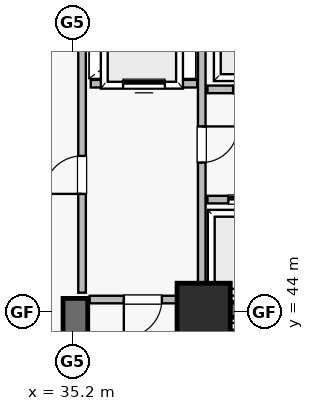
"""IFC4 building model, lengths in metres.
Left out: names, types, materials, properties, quantities, classifications, styles, units other than length and angle.
Written with IfcOpenShell. Run it as: python <this file> out.ifc"""

import sys

from ifc_helpers import new_model, si_unit, direction, frame, frame_2d, origin, origin_2d, place, context, subcontext, project, spatial, rectangle, extrude, element, fill, save


model = new_model("IFC4")
c1 = context("Model", 3, precision=1e-05, world=origin(), true_north=direction((0.0, 1.0)))
c2 = subcontext(c1, "Body", "Model", "MODEL_VIEW")
j1 = project(units=[si_unit("LENGTHUNIT", "METRE"), si_unit("PLANEANGLEUNIT", "RADIAN")], contexts=[c1])
p1 = place(None, origin())
s1 = spatial("IfcSite", under=j1, at=p1, CompositionType="ELEMENT")
p2 = place(p1, origin())
s2 = spatial("IfcBuilding", under=s1, at=p2, CompositionType="ELEMENT")
p3 = place(p2, origin())
s3 = spatial("IfcBuildingStorey", under=s2, at=p3, CompositionType="ELEMENT", Elevation=0.0)
p4 = place(p3, frame((35.275, 34.95, 0.0), z_axis=(0.0, 0.0, 1.0), x_axis=(0.0, 1.0, 0.0)))
e1 = element("IfcWall", 1, at=p4, inside=s3, PredefinedType="SHEAR", context=c2, shape_type="SweptSolid", body=[
    extrude(rectangle(XDim=9.4, YDim=0.65, at=frame_2d((4.7, 0.0))), origin(), (0.0, 0.0, 1.0), 4.5),
])
p5 = place(p3, frame((38.775, 35.4, 0.0), z_axis=(0.0, 0.0, 1.0), x_axis=(0.0, 1.0, 0.0)))
e2 = element("IfcWall", 2, at=p5, inside=s3, PredefinedType="SHEAR", context=c2, shape_type="SweptSolid", body=[
    extrude(rectangle(XDim=8.95, YDim=0.65, at=frame_2d((4.475, 0.0))), origin(), (0.0, 0.0, 1.0), 4.5),
])
p6 = place(p3, frame((38.75, 44.05, 0.0), z_axis=(0.0, 0.0, 1.0), x_axis=(1.0, 0.0, 0.0)))
e3 = element("IfcWall", 3, at=p6, inside=s3, PredefinedType="SHEAR", context=c2, shape_type="SweptSolid", body=[
    extrude(rectangle(XDim=4.2, YDim=0.4, at=frame_2d((2.1, 0.0))), origin(), (0.0, 0.0, 1.0), 4.5),
])
p7 = place(p3, frame((38.65, 44.05, 0.0), z_axis=(0.0, 0.0, 1.0), x_axis=(1.0, 0.0, 0.0)))
e4 = element("IfcColumn", 4, at=p7, inside=s3, PredefinedType="COLUMN", context=c2, shape_type="SweptSolid", body=[
    extrude(rectangle(XDim=1.4, YDim=1.4, at=origin_2d()), origin(), (0.0, 0.0, 1.0), 4.8),
])
p8 = place(p3, frame((35.45, 44.5, 0.0), z_axis=(0.0, 0.0, 1.0), x_axis=(0.0, 1.0, 0.0)))
e5 = element("IfcWall", 5, at=p8, inside=s3, PredefinedType="SOLIDWALL", context=c2, shape_type="SweptSolid", body=[
    extrude(rectangle(XDim=7.92, YDim=0.2, at=frame_2d((3.96, 0.0))), origin(), (0.0, 0.0, 1.0), 4.5),
])
p9 = place(p8, frame((2.6, 0.0, 0.0)))
e6 = element("IfcOpeningElement", 6, at=p9, cuts=e5, PredefinedType="OPENING", context=c2, shape_type="SweptSolid", body=[
    extrude(rectangle(XDim=1.0, YDim=2.15, at=frame_2d((0.5, 1.075))), frame((0.0, 0.11, 0.0), z_axis=(0.0, -1.0, 0.0), x_axis=(1.0, 0.0, 0.0)), (0.0, 0.0, 1.0), 0.22),
])
p10 = place(p3, frame((38.6, 44.5, 0.0), z_axis=(0.0, 0.0, 1.0), x_axis=(0.0, 1.0, 0.0)))
e7 = element("IfcWall", 7, at=p10, inside=s3, PredefinedType="SOLIDWALL", context=c2, shape_type="SweptSolid", body=[
    extrude(rectangle(XDim=7.92, YDim=0.2, at=frame_2d((3.96, 0.0))), origin(), (0.0, 0.0, 1.0), 4.5),
])
p11 = place(p10, frame((3.425, 0.0, 0.0)))
e8 = element("IfcOpeningElement", 8, at=p11, cuts=e7, PredefinedType="OPENING", context=c2, shape_type="SweptSolid", body=[
    extrude(rectangle(XDim=0.95, YDim=2.15, at=frame_2d((0.475, 1.075))), frame((0.0, 0.11, 0.0), z_axis=(0.0, -1.0, 0.0), x_axis=(1.0, 0.0, 0.0)), (0.0, 0.0, 1.0), 0.22),
])
p12 = place(p3, frame((38.75, 49.85, 0.0), z_axis=(0.0, 0.0, 1.0), x_axis=(1.0, 0.0, 0.0)))
e9 = element("IfcWall", 9, at=p12, inside=s3, PredefinedType="SOLIDWALL", context=c2, shape_type="SweptSolid", body=[
    extrude(rectangle(XDim=5.5, YDim=0.2, at=frame_2d((2.75, 0.0))), origin(), (0.0, 0.0, 1.0), 4.5),
])
p13 = place(p12, frame((0.675, 0.0, 0.0)))
e10 = element("IfcOpeningElement", 10, at=p13, cuts=e9, PredefinedType="OPENING", context=c2, shape_type="SweptSolid", body=[
    extrude(rectangle(XDim=1.05, YDim=2.15, at=frame_2d((0.525, 1.075))), frame((0.0, 0.11, 0.0), z_axis=(0.0, -1.0, 0.0), x_axis=(1.0, 0.0, 0.0)), (0.0, 0.0, 1.0), 0.22),
])
p14 = place(p12, frame((3.075, 0.0, 0.0)))
e11 = element("IfcOpeningElement", 11, at=p14, cuts=e9, PredefinedType="OPENING", context=c2, shape_type="SweptSolid", body=[
    extrude(rectangle(XDim=1.05, YDim=2.15, at=frame_2d((0.525, 1.075))), frame((0.0, 0.11, 0.0), z_axis=(0.0, -1.0, 0.0), x_axis=(1.0, 0.0, 0.0)), (0.0, 0.0, 1.0), 0.22),
])
p15 = place(p3, frame((38.75, 46.95, 0.0), z_axis=(0.0, 0.0, 1.0), x_axis=(1.0, 0.0, 0.0)))
e12 = element("IfcWall", 12, at=p15, inside=s3, PredefinedType="SOLIDWALL", context=c2, shape_type="SweptSolid", body=[
    extrude(rectangle(XDim=4.33, YDim=0.2, at=frame_2d((2.165, 0.0))), origin(), (0.0, 0.0, 1.0), 4.5),
])
p16 = place(p15, frame((0.55, 0.0, 0.0)))
e13 = element("IfcOpeningElement", 13, at=p16, cuts=e12, PredefinedType="OPENING", context=c2, shape_type="SweptSolid", body=[
    extrude(rectangle(XDim=1.0, YDim=2.15, at=frame_2d((0.5, 1.075))), frame((0.0, 0.11, 0.0), z_axis=(0.0, -1.0, 0.0), x_axis=(1.0, 0.0, 0.0)), (0.0, 0.0, 1.0), 0.22),
])
p17 = place(p15, frame((2.75, 0.0, 0.0)))
e14 = element("IfcOpeningElement", 14, at=p17, cuts=e12, PredefinedType="OPENING", context=c2, shape_type="SweptSolid", body=[
    extrude(rectangle(XDim=1.0, YDim=2.15, at=frame_2d((0.5, 1.075))), frame((0.0, 0.11, 0.0), z_axis=(0.0, -1.0, 0.0), x_axis=(1.0, 0.0, 0.0)), (0.0, 0.0, 1.0), 0.22),
])
p18 = place(p3, frame((35.65, 44.32, 0.0), z_axis=(0.0, 0.0, 1.0), x_axis=(1.0, 0.0, 0.0)))
e15 = element("IfcWall", 15, at=p18, inside=s3, PredefinedType="SOLIDWALL", context=c2, shape_type="SweptSolid", body=[
    extrude(rectangle(XDim=2.8, YDim=0.2, at=frame_2d((1.4, 0.0))), origin(), (0.0, 0.0, 1.0), 4.5),
])
p19 = place(p18, frame((0.9, 0.0, 0.0)))
e16 = element("IfcOpeningElement", 16, at=p19, cuts=e15, PredefinedType="OPENING", context=c2, shape_type="SweptSolid", body=[
    extrude(rectangle(XDim=1.0, YDim=2.15, at=frame_2d((0.5, 1.075))), frame((0.0, 0.11, 0.0), z_axis=(0.0, -1.0, 0.0), x_axis=(1.0, 0.0, 0.0)), (0.0, 0.0, 1.0), 0.22),
])
p20 = place(p3, frame((35.68, 50.0, 0.0), z_axis=(0.0, 0.0, 1.0), x_axis=(1.0, 0.0, 0.0)))
e17 = element("IfcWall", 17, at=p20, inside=s3, PredefinedType="SOLIDWALL", context=c2, shape_type="SweptSolid", body=[
    extrude(rectangle(XDim=2.8, YDim=0.2, at=frame_2d((1.4, 0.0))), origin(), (0.0, 0.0, 1.0), 4.5),
])
p21 = place(p20, frame((0.85, 0.0, 0.0)))
e18 = element("IfcOpeningElement", 18, at=p21, cuts=e17, PredefinedType="OPENING", context=c2, shape_type="SweptSolid", body=[
    extrude(rectangle(XDim=1.1, YDim=2.15, at=frame_2d((0.55, 1.075))), frame((0.0, 0.11, 0.0), z_axis=(0.0, -1.0, 0.0), x_axis=(1.0, 0.0, 0.0)), (0.0, 0.0, 1.0), 0.22),
])
p22 = place(p19, frame((1.0, 0.0, 0.0), z_axis=(0.0, 0.0, 1.0), x_axis=(-1.0, 0.0, 0.0)))
e19 = element("IfcDoor", 19, at=p22, inside=s3, OperationType="SINGLE_SWING_LEFT", PredefinedType="DOOR", context=c2, shape_type="SweptSolid", body=[
    extrude(rectangle(XDim=1.0, YDim=2.15, at=frame_2d((0.5, 1.075))), frame((0.0, 0.025, 0.0), z_axis=(0.0, -1.0, 0.0), x_axis=(1.0, 0.0, 0.0)), (0.0, 0.0, 1.0), 0.05),
])
fill(e16, e19)
p23 = place(p9, origin())
e20 = element("IfcDoor", 20, at=p23, inside=s3, OperationType="SINGLE_SWING_LEFT", PredefinedType="DOOR", context=c2, shape_type="SweptSolid", body=[
    extrude(rectangle(XDim=1.0, YDim=2.15, at=frame_2d((0.5, 1.075))), frame((0.0, 0.025, 0.0), z_axis=(0.0, -1.0, 0.0), x_axis=(1.0, 0.0, 0.0)), (0.0, 0.0, 1.0), 0.05),
])
fill(e6, e20)
p24 = place(p11, frame((0.95, 0.0, 0.0), z_axis=(0.0, 0.0, 1.0), x_axis=(-1.0, 0.0, 0.0)))
e21 = element("IfcDoor", 21, at=p24, inside=s3, OperationType="SINGLE_SWING_RIGHT", PredefinedType="DOOR", context=c2, shape_type="SweptSolid", body=[
    extrude(rectangle(XDim=0.95, YDim=2.15, at=frame_2d((0.475, 1.075))), frame((0.0, 0.025, 0.0), z_axis=(0.0, -1.0, 0.0), x_axis=(1.0, 0.0, 0.0)), (0.0, 0.0, 1.0), 0.05),
])
fill(e8, e21)
p25 = place(p21, origin())
e22 = element("IfcDoor", 22, at=p25, inside=s3, OperationType="SLIDING_TO_LEFT", PredefinedType="DOOR", context=c2, shape_type="SweptSolid", body=[
    extrude(rectangle(XDim=1.1, YDim=2.15, at=frame_2d((0.55, 1.075))), frame((0.0, 0.025, 0.0), z_axis=(0.0, -1.0, 0.0), x_axis=(1.0, 0.0, 0.0)), (0.0, 0.0, 1.0), 0.05),
])
fill(e18, e22)
p26 = place(p13, origin())
e23 = element("IfcDoor", 23, at=p26, inside=s3, OperationType="SLIDING_TO_LEFT", PredefinedType="DOOR", context=c2, shape_type="SweptSolid", body=[
    extrude(rectangle(XDim=1.05, YDim=2.15, at=frame_2d((0.525, 1.075))), frame((0.0, 0.025, 0.0), z_axis=(0.0, -1.0, 0.0), x_axis=(1.0, 0.0, 0.0)), (0.0, 0.0, 1.0), 0.05),
])
fill(e10, e23)
p27 = place(p16, origin())
e24 = element("IfcDoor", 24, at=p27, inside=s3, OperationType="SLIDING_TO_LEFT", PredefinedType="DOOR", context=c2, shape_type="SweptSolid", body=[
    extrude(rectangle(XDim=1.0, YDim=2.15, at=frame_2d((0.5, 1.075))), frame((0.0, 0.025, 0.0), z_axis=(0.0, -1.0, 0.0), x_axis=(1.0, 0.0, 0.0)), (0.0, 0.0, 1.0), 0.05),
])
fill(e13, e24)
save(model, sys.argv[1])
